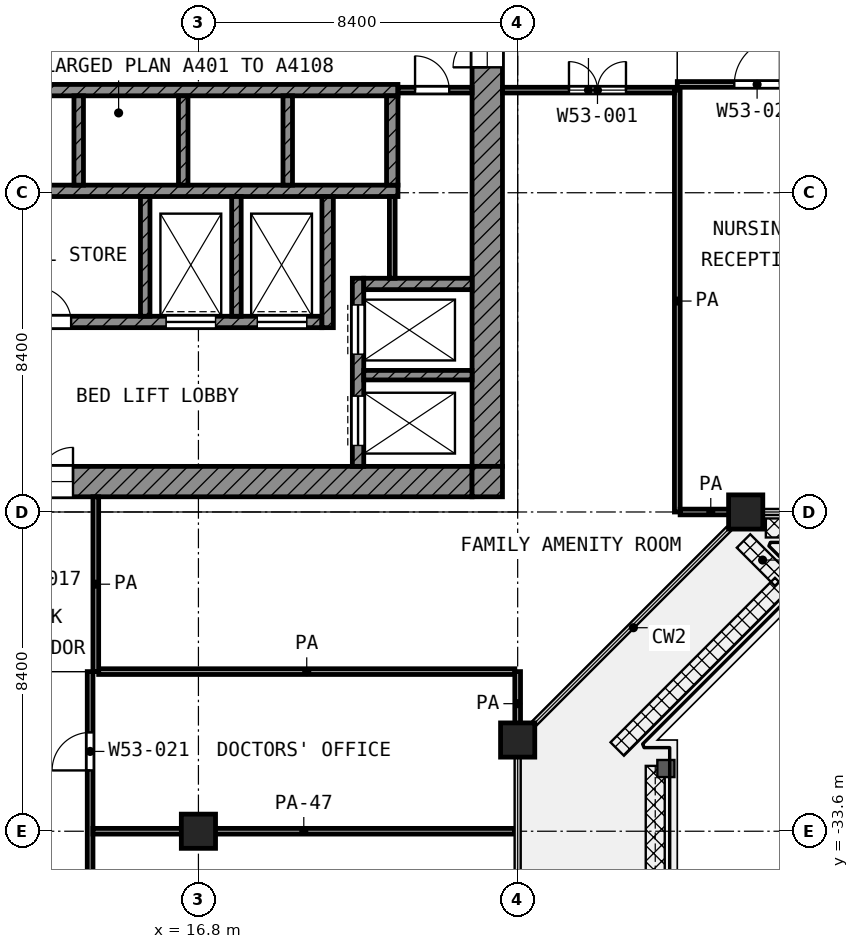
"""IFC4 building model, lengths in metres.
Left out: names, types, materials, properties, quantities, classifications, styles, units other than length and angle.
Written with IfcOpenShell. Run it as: python <this file> out.ifc"""

import sys

from ifc_helpers import new_model, si_unit, direction, frame, frame_2d, origin, origin_2d, place, context, subcontext, project, spatial, rectangle, extrude, element, fill, save


model = new_model("IFC4")
c1 = context("Model", 3, precision=1e-05, world=origin(), true_north=direction((0.0, 1.0)))
c2 = subcontext(c1, "Body", "Model", "MODEL_VIEW")
j1 = project(units=[si_unit("LENGTHUNIT", "METRE"), si_unit("PLANEANGLEUNIT", "RADIAN")], contexts=[c1])
p1 = place(None, origin())
s1 = spatial("IfcSite", under=j1, at=p1, CompositionType="ELEMENT")
p2 = place(p1, origin())
s2 = spatial("IfcBuilding", under=s1, at=p2, CompositionType="ELEMENT")
p3 = place(p2, frame((0.0, 0.0, 251.6)))
s3 = spatial("IfcBuildingStorey", under=s2, at=p3, CompositionType="ELEMENT", Elevation=251.6)
for number, where, z_axis, x_axis in (
    (1, (31.2, -25.2, 0.0), (0.0, 0.0, 1.0), (1.0, 0.0, 0.0)),
    (2, (25.2, -31.2, 0.0), (0.0, 0.0, 1.0), (1.0, 0.0, 0.0)),
    (3, (16.8, -33.6, 0.0), (0.0, 0.0, 1.0), (1.0, 0.0, 0.0)),
):
    element("IfcColumn", number, at=place(p3, frame(where, z_axis=z_axis, x_axis=x_axis)), inside=s3, PredefinedType="COLUMN", context=c2, shape_type="SweptSolid", body=[
        extrude(rectangle(XDim=0.9, YDim=0.9, at=origin_2d()), origin(), (0.0, 0.0, 1.0), 4.2),
    ])
p4 = place(p3, frame((24.4, -24.0, 0.0), z_axis=(0.0, 0.0, 1.0), x_axis=(0.0, 1.0, 0.0)))
e4 = element("IfcWall", 4, at=p4, inside=s3, PredefinedType="SHEAR", context=c2, shape_type="SweptSolid", body=[
    extrude(rectangle(XDim=18.6, YDim=0.8, at=frame_2d((9.3, 0.0))), origin(), (0.0, 0.0, 1.0), 3.6),
])
p5 = place(p4, frame((10.5, 0.0, 0.0)))
e5 = element("IfcOpeningElement", 5, at=p5, cuts=e4, PredefinedType="OPENING", context=c2, shape_type="SweptSolid", body=[
    extrude(rectangle(XDim=1.8, YDim=2.1, at=frame_2d((0.9, 1.05))), frame((0.0, 0.41, 0.0), z_axis=(0.0, -1.0, 0.0), x_axis=(1.0, 0.0, 0.0)), (0.0, 0.0, 1.0), 0.82),
])
p6 = place(p3, frame((5.4, -24.4, 0.0), z_axis=(0.0, 0.0, 1.0), x_axis=(1.0, 0.0, 0.0)))
e6 = element("IfcWall", 6, at=p6, inside=s3, PredefinedType="SHEAR", context=c2, shape_type="SweptSolid", body=[
    extrude(rectangle(XDim=18.6, YDim=0.8, at=frame_2d((9.3, 0.0))), origin(), (0.0, 0.0, 1.0), 3.6),
])
p7 = place(p6, frame((6.3, 0.0, 0.0)))
e7 = element("IfcOpeningElement", 7, at=p7, cuts=e6, PredefinedType="OPENING", context=c2, shape_type="SweptSolid", body=[
    extrude(rectangle(XDim=1.8, YDim=2.1, at=frame_2d((0.9, 1.05))), frame((0.0, 0.41, 0.0), z_axis=(0.0, -1.0, 0.0), x_axis=(1.0, 0.0, 0.0)), (0.0, 0.0, 1.0), 0.82),
])
p8 = place(p3, frame((24.4, -24.8, 0.0), z_axis=(0.0, 0.0, 1.0), x_axis=(0.0, 1.0, 0.0)))
e8 = element("IfcWall", 8, at=p8, inside=s3, PredefinedType="SHEAR", context=c2, shape_type="SweptSolid", body=[
    extrude(rectangle(XDim=0.8, YDim=0.8, at=frame_2d((0.4, 0.0))), origin(), (0.0, 0.0, 1.0), 3.6),
])
p9 = place(p3, frame((5.4, -14.1, 0.0), z_axis=(0.0, 0.0, 1.0), x_axis=(1.0, 0.0, 0.0)))
e9 = element("IfcWall", 9, at=p9, inside=s3, PredefinedType="SHEAR", context=c2, shape_type="SweptSolid", body=[
    extrude(rectangle(XDim=16.65, YDim=0.3, at=frame_2d((8.325, 0.0))), origin(), (0.0, 0.0, 1.0), 3.6),
])
p10 = place(p9, frame((0.825, 0.0, 0.0)))
e10 = element("IfcOpeningElement", 10, at=p10, cuts=e9, PredefinedType="OPENING", context=c2, shape_type="SweptSolid", body=[
    extrude(rectangle(XDim=1.1, YDim=2.1, at=frame_2d((0.55, 1.05))), frame((0.0, 0.16, 0.0), z_axis=(0.0, -1.0, 0.0), x_axis=(1.0, 0.0, 0.0)), (0.0, 0.0, 1.0), 0.32),
])
p11 = place(p9, frame((3.575, 0.0, 0.0)))
e11 = element("IfcOpeningElement", 11, at=p11, cuts=e9, PredefinedType="OPENING", context=c2, shape_type="SweptSolid", body=[
    extrude(rectangle(XDim=1.1, YDim=2.1, at=frame_2d((0.55, 1.05))), frame((0.0, 0.16, 0.0), z_axis=(0.0, -1.0, 0.0), x_axis=(1.0, 0.0, 0.0)), (0.0, 0.0, 1.0), 0.32),
])
p12 = place(p3, frame((5.4, -16.75, 0.0), z_axis=(0.0, 0.0, 1.0), x_axis=(1.0, 0.0, 0.0)))
e12 = element("IfcWall", 12, at=p12, inside=s3, PredefinedType="SHEAR", context=c2, shape_type="SweptSolid", body=[
    extrude(rectangle(XDim=16.65, YDim=0.3, at=frame_2d((8.325, 0.0))), origin(), (0.0, 0.0, 1.0), 3.6),
])
p13 = place(p3, frame((5.4, -20.2, 0.0), z_axis=(0.0, 0.0, 1.0), x_axis=(1.0, 0.0, 0.0)))
e13 = element("IfcWall", 13, at=p13, inside=s3, PredefinedType="SHEAR", context=c2, shape_type="SweptSolid", body=[
    extrude(rectangle(XDim=14.65, YDim=0.3, at=frame_2d((7.325, 0.0))), origin(), (0.0, 0.0, 1.0), 3.6),
])
p14 = place(p13, frame((10.55, 0.0, 0.0)))
e14 = element("IfcOpeningElement", 14, at=p14, cuts=e13, PredefinedType="OPENING", context=c2, shape_type="SweptSolid", body=[
    extrude(rectangle(XDim=1.3, YDim=2.1, at=frame_2d((0.65, 1.05))), frame((0.0, 0.16, 0.0), z_axis=(0.0, -1.0, 0.0), x_axis=(1.0, 0.0, 0.0)), (0.0, 0.0, 1.0), 0.32),
])
p15 = place(p13, frame((12.95, 0.0, 0.0)))
e15 = element("IfcOpeningElement", 15, at=p15, cuts=e13, PredefinedType="OPENING", context=c2, shape_type="SweptSolid", body=[
    extrude(rectangle(XDim=1.3, YDim=2.1, at=frame_2d((0.65, 1.05))), frame((0.0, 0.16, 0.0), z_axis=(0.0, -1.0, 0.0), x_axis=(1.0, 0.0, 0.0)), (0.0, 0.0, 1.0), 0.32),
])
p16 = place(p13, frame((0.55, 0.0, 0.0)))
e16 = element("IfcOpeningElement", 16, at=p16, cuts=e13, PredefinedType="OPENING", context=c2, shape_type="SweptSolid", body=[
    extrude(rectangle(XDim=1.3, YDim=2.1, at=frame_2d((0.65, 1.05))), frame((0.0, 0.16, 0.0), z_axis=(0.0, -1.0, 0.0), x_axis=(1.0, 0.0, 0.0)), (0.0, 0.0, 1.0), 0.32),
])
p17 = place(p13, frame((2.95, 0.0, 0.0)))
e17 = element("IfcOpeningElement", 17, at=p17, cuts=e13, PredefinedType="OPENING", context=c2, shape_type="SweptSolid", body=[
    extrude(rectangle(XDim=1.3, YDim=2.1, at=frame_2d((0.65, 1.05))), frame((0.0, 0.16, 0.0), z_axis=(0.0, -1.0, 0.0), x_axis=(1.0, 0.0, 0.0)), (0.0, 0.0, 1.0), 0.32),
])
p18 = place(p13, frame((7.15, 0.0, 0.0)))
e18 = element("IfcOpeningElement", 18, at=p18, cuts=e13, PredefinedType="OPENING", context=c2, shape_type="SweptSolid", body=[
    extrude(rectangle(XDim=0.9, YDim=2.1, at=frame_2d((0.45, 1.05))), frame((0.0, 0.16, 0.0), z_axis=(0.0, -1.0, 0.0), x_axis=(1.0, 0.0, 0.0)), (0.0, 0.0, 1.0), 0.32),
])
p19 = place(p3, frame((20.2, -20.35, 0.0), z_axis=(0.0, 0.0, 1.0), x_axis=(0.0, 1.0, 0.0)))
e19 = element("IfcWall", 19, at=p19, inside=s3, PredefinedType="SHEAR", context=c2, shape_type="SweptSolid", body=[
    extrude(rectangle(XDim=3.45, YDim=0.3, at=frame_2d((1.725, 0.0))), origin(), (0.0, 0.0, 1.0), 3.6),
])
p20 = place(p3, frame((21.9, -16.6, 0.0), z_axis=(0.0, 0.0, 1.0), x_axis=(0.0, 1.0, 0.0)))
e20 = element("IfcWall", 20, at=p20, inside=s3, PredefinedType="SHEAR", context=c2, shape_type="SweptSolid", body=[
    extrude(rectangle(XDim=2.35, YDim=0.3, at=frame_2d((1.175, 0.0))), origin(), (0.0, 0.0, 1.0), 3.6),
])
p21 = place(p3, frame((21.15, -19.2, 0.0), z_axis=(0.0, 0.0, 1.0), x_axis=(1.0, 0.0, 0.0)))
e21 = element("IfcWall", 21, at=p21, inside=s3, PredefinedType="SHEAR", context=c2, shape_type="SweptSolid", body=[
    extrude(rectangle(XDim=2.85, YDim=0.3, at=frame_2d((1.425, 0.0))), origin(), (0.0, 0.0, 1.0), 3.6),
])
p22 = place(p3, frame((21.0, -24.0, 0.0), z_axis=(0.0, 0.0, 1.0), x_axis=(0.0, 1.0, 0.0)))
e22 = element("IfcWall", 22, at=p22, inside=s3, PredefinedType="SHEAR", context=c2, shape_type="SweptSolid", body=[
    extrude(rectangle(XDim=4.95, YDim=0.3, at=frame_2d((2.475, 0.0))), origin(), (0.0, 0.0, 1.0), 3.6),
])
p23 = place(p22, frame((2.95, 0.0, 0.0)))
e23 = element("IfcOpeningElement", 23, at=p23, cuts=e22, PredefinedType="OPENING", context=c2, shape_type="SweptSolid", body=[
    extrude(rectangle(XDim=1.3, YDim=2.1, at=frame_2d((0.65, 1.05))), frame((0.0, 0.16, 0.0), z_axis=(0.0, -1.0, 0.0), x_axis=(1.0, 0.0, 0.0)), (0.0, 0.0, 1.0), 0.32),
])
p24 = place(p22, frame((0.55, 0.0, 0.0)))
e24 = element("IfcOpeningElement", 24, at=p24, cuts=e22, PredefinedType="OPENING", context=c2, shape_type="SweptSolid", body=[
    extrude(rectangle(XDim=1.3, YDim=2.1, at=frame_2d((0.65, 1.05))), frame((0.0, 0.16, 0.0), z_axis=(0.0, -1.0, 0.0), x_axis=(1.0, 0.0, 0.0)), (0.0, 0.0, 1.0), 0.32),
])
p25 = place(p3, frame((21.15, -21.6, 0.0), z_axis=(0.0, 0.0, 1.0), x_axis=(1.0, 0.0, 0.0)))
e25 = element("IfcWall", 25, at=p25, inside=s3, PredefinedType="SHEAR", context=c2, shape_type="SweptSolid", body=[
    extrude(rectangle(XDim=2.85, YDim=0.25, at=frame_2d((1.425, 0.0))), origin(), (0.0, 0.0, 1.0), 3.6),
])
for number, where, z_axis, x_axis in (
    (26, (15.4, -20.05, 0.0), (0.0, 0.0, 1.0), (0.0, 1.0, 0.0)),
    (27, (17.8, -20.05, 0.0), (0.0, 0.0, 1.0), (0.0, 1.0, 0.0)),
):
    element("IfcWall", number, at=place(p3, frame(where, z_axis=z_axis, x_axis=x_axis)), inside=s3, PredefinedType="SHEAR", context=c2, shape_type="SweptSolid", body=[
        extrude(rectangle(XDim=3.15, YDim=0.25, at=frame_2d((1.575, 0.0))), origin(), (0.0, 0.0, 1.0), 3.6),
    ])
for number, where, z_axis, x_axis in (
    (28, (13.65, -16.6, 0.0), (0.0, 0.0, 1.0), (0.0, 1.0, 0.0)),
    (29, (16.4, -16.6, 0.0), (0.0, 0.0, 1.0), (0.0, 1.0, 0.0)),
    (30, (19.15, -16.6, 0.0), (0.0, 0.0, 1.0), (0.0, 1.0, 0.0)),
):
    element("IfcWall", number, at=place(p3, frame(where, z_axis=z_axis, x_axis=x_axis)), inside=s3, PredefinedType="SHEAR", context=c2, shape_type="SweptSolid", body=[
        extrude(rectangle(XDim=2.35, YDim=0.25, at=frame_2d((1.175, 0.0))), origin(), (0.0, 0.0, 1.0), 3.6),
    ])
p26 = place(p3, frame((21.9, -19.05, 0.0), z_axis=(0.0, 0.0, 1.0), x_axis=(0.0, 1.0, 0.0)))
e31 = element("IfcWall", 31, at=p26, inside=s3, PredefinedType="PARTITIONING", context=c2, shape_type="SweptSolid", body=[
    extrude(rectangle(XDim=2.15, YDim=0.15, at=frame_2d((1.075, 0.0))), origin(), (0.0, 0.0, 1.0), 3.6),
])
p27 = place(p3, frame((22.05, -14.1, 0.0), z_axis=(0.0, 0.0, 1.0), x_axis=(1.0, 0.0, 0.0)))
e32 = element("IfcWall", 32, at=p27, inside=s3, PredefinedType="PARTITIONING", context=c2, shape_type="SweptSolid", body=[
    extrude(rectangle(XDim=1.95, YDim=0.15, at=frame_2d((0.975, 0.0))), origin(), (0.0, 0.0, 1.0), 3.6),
])
p28 = place(p27, frame((0.45, 0.0, 0.0)))
e33 = element("IfcOpeningElement", 33, at=p28, cuts=e32, PredefinedType="OPENING", context=c2, shape_type="SweptSolid", body=[
    extrude(rectangle(XDim=0.9, YDim=2.1, at=frame_2d((0.45, 1.05))), frame((0.0, 0.085, 0.0), z_axis=(0.0, -1.0, 0.0), x_axis=(1.0, 0.0, 0.0)), (0.0, 0.0, 1.0), 0.17),
])
p29 = place(p3, frame((14.025, -33.6, 0.0), z_axis=(0.0, 0.0, 1.0), x_axis=(1.0, 0.0, 0.0)))
e34 = element("IfcWall", 34, at=p29, inside=s3, PredefinedType="PARTITIONING", context=c2, shape_type="SweptSolid", body=[
    extrude(rectangle(XDim=11.095, YDim=0.15, at=frame_2d((5.548, 0.0))), origin(), (0.0, 0.0, 1.0), 2.7),
])
p30 = place(p3, frame((14.175, -29.4, 0.0), z_axis=(0.0, 0.0, 1.0), x_axis=(1.0, 0.0, 0.0)))
e35 = element("IfcWall", 35, at=p30, inside=s3, PredefinedType="PARTITIONING", context=c2, shape_type="SweptSolid", body=[
    extrude(rectangle(XDim=10.95, YDim=0.15, at=frame_2d((5.475, 0.0))), origin(), (0.0, 0.0, 1.0), 3.6),
])
p31 = place(p3, frame((29.475, -25.2, 0.0), z_axis=(0.0, 0.0, 1.0), x_axis=(1.0, 0.0, 0.0)))
e36 = element("IfcWall", 36, at=p31, inside=s3, PredefinedType="PARTITIONING", context=c2, shape_type="SweptSolid", body=[
    extrude(rectangle(XDim=1.612, YDim=0.15, at=frame_2d((0.806, 0.0))), origin(), (0.0, 0.0, 1.0), 3.6),
])
p32 = place(p3, frame((24.8, -14.1, 0.0), z_axis=(0.0, 0.0, 1.0), x_axis=(1.0, 0.0, 0.0)))
e37 = element("IfcWall", 37, at=p32, inside=s3, PredefinedType="PARTITIONING", context=c2, shape_type="SweptSolid", body=[
    extrude(rectangle(XDim=4.525, YDim=0.15, at=frame_2d((2.262, 0.0))), origin(), (0.0, 0.0, 1.0), 3.6),
])
p33 = place(p32, frame((1.75, 0.0, 0.0)))
e38 = element("IfcOpeningElement", 38, at=p33, cuts=e37, PredefinedType="OPENING", context=c2, shape_type="SweptSolid", body=[
    extrude(rectangle(XDim=1.5, YDim=2.1, at=frame_2d((0.75, 1.05))), frame((0.0, 0.085, 0.0), z_axis=(0.0, -1.0, 0.0), x_axis=(1.0, 0.0, 0.0)), (0.0, 0.0, 1.0), 0.17),
])
p34 = place(p3, frame((29.4, -13.95, 0.0), z_axis=(0.0, 0.0, 1.0), x_axis=(1.0, 0.0, 0.0)))
e39 = element("IfcWall", 39, at=p34, inside=s3, PredefinedType="PARTITIONING", context=c2, shape_type="SweptSolid", body=[
    extrude(rectangle(XDim=33.52, YDim=0.15, at=frame_2d((16.76, 0.0))), origin(), (0.0, 0.0, 1.0), 2.7),
])
p35 = place(p34, frame((1.5, 0.0, 0.0)))
e40 = element("IfcOpeningElement", 40, at=p35, cuts=e39, PredefinedType="OPENING", context=c2, shape_type="SweptSolid", body=[
    extrude(rectangle(XDim=1.2, YDim=2.1, at=frame_2d((0.6, 1.05))), frame((0.0, 0.085, 0.0), z_axis=(0.0, -1.0, 0.0), x_axis=(1.0, 0.0, 0.0)), (0.0, 0.0, 1.0), 0.17),
])
p36 = place(p34, frame((6.1, 0.0, 0.0)))
e41 = element("IfcOpeningElement", 41, at=p36, cuts=e39, PredefinedType="OPENING", context=c2, shape_type="SweptSolid", body=[
    extrude(rectangle(XDim=1.0, YDim=2.1, at=frame_2d((0.5, 1.05))), frame((0.0, 0.085, 0.0), z_axis=(0.0, -1.0, 0.0), x_axis=(1.0, 0.0, 0.0)), (0.0, 0.0, 1.0), 0.17),
])
p37 = place(p34, frame((11.3, 0.0, 0.0)))
e42 = element("IfcOpeningElement", 42, at=p37, cuts=e39, PredefinedType="OPENING", context=c2, shape_type="SweptSolid", body=[
    extrude(rectangle(XDim=1.1, YDim=2.1, at=frame_2d((0.55, 1.05))), frame((0.0, 0.085, 0.0), z_axis=(0.0, -1.0, 0.0), x_axis=(1.0, 0.0, 0.0)), (0.0, 0.0, 1.0), 0.17),
])
p38 = place(p34, frame((13.0, 0.0, 0.0)))
e43 = element("IfcOpeningElement", 43, at=p38, cuts=e39, PredefinedType="OPENING", context=c2, shape_type="SweptSolid", body=[
    extrude(rectangle(XDim=1.2, YDim=2.1, at=frame_2d((0.6, 1.05))), frame((0.0, 0.085, 0.0), z_axis=(0.0, -1.0, 0.0), x_axis=(1.0, 0.0, 0.0)), (0.0, 0.0, 1.0), 0.17),
])
p39 = place(p34, frame((22.6, 0.0, 0.0)))
e44 = element("IfcOpeningElement", 44, at=p39, cuts=e39, PredefinedType="OPENING", context=c2, shape_type="SweptSolid", body=[
    extrude(rectangle(XDim=1.2, YDim=2.1, at=frame_2d((0.6, 1.05))), frame((0.0, 0.085, 0.0), z_axis=(0.0, -1.0, 0.0), x_axis=(1.0, 0.0, 0.0)), (0.0, 0.0, 1.0), 0.17),
])
p40 = place(p34, frame((20.3, 0.0, 0.0)))
e45 = element("IfcOpeningElement", 45, at=p40, cuts=e39, PredefinedType="OPENING", context=c2, shape_type="SweptSolid", body=[
    extrude(rectangle(XDim=1.2, YDim=2.1, at=frame_2d((0.6, 1.05))), frame((0.0, 0.085, 0.0), z_axis=(0.0, -1.0, 0.0), x_axis=(1.0, 0.0, 0.0)), (0.0, 0.0, 1.0), 0.17),
])
p41 = place(p34, frame((28.0, 0.0, 0.0)))
e46 = element("IfcOpeningElement", 46, at=p41, cuts=e39, PredefinedType="OPENING", context=c2, shape_type="SweptSolid", body=[
    extrude(rectangle(XDim=1.2, YDim=2.1, at=frame_2d((0.6, 1.05))), frame((0.0, 0.085, 0.0), z_axis=(0.0, -1.0, 0.0), x_axis=(1.0, 0.0, 0.0)), (0.0, 0.0, 1.0), 0.17),
])
p42 = place(p34, frame((31.0, 0.0, 0.0)))
e47 = element("IfcOpeningElement", 47, at=p42, cuts=e39, PredefinedType="OPENING", context=c2, shape_type="SweptSolid", body=[
    extrude(rectangle(XDim=1.0, YDim=2.1, at=frame_2d((0.5, 1.05))), frame((0.0, 0.085, 0.0), z_axis=(0.0, -1.0, 0.0), x_axis=(1.0, 0.0, 0.0)), (0.0, 0.0, 1.0), 0.17),
])
p43 = place(p3, frame((13.95, -46.12, 0.0), z_axis=(0.0, 0.0, 1.0), x_axis=(0.0, 1.0, 0.0)))
e48 = element("IfcWall", 48, at=p43, inside=s3, PredefinedType="PARTITIONING", context=c2, shape_type="SweptSolid", body=[
    extrude(rectangle(XDim=16.72, YDim=0.15, at=frame_2d((8.36, 0.0))), origin(), (0.0, 0.0, 1.0), 3.6),
])
p44 = place(p43, frame((14.12, 0.0, 0.0)))
e49 = element("IfcOpeningElement", 49, at=p44, cuts=e48, PredefinedType="OPENING", context=c2, shape_type="SweptSolid", body=[
    extrude(rectangle(XDim=1.0, YDim=2.1, at=frame_2d((0.5, 1.05))), frame((0.0, 0.085, 0.0), z_axis=(0.0, -1.0, 0.0), x_axis=(1.0, 0.0, 0.0)), (0.0, 0.0, 1.0), 0.17),
])
p45 = place(p43, frame((9.92, 0.0, 0.0)))
e50 = element("IfcOpeningElement", 50, at=p45, cuts=e48, PredefinedType="OPENING", context=c2, shape_type="SweptSolid", body=[
    extrude(rectangle(XDim=1.0, YDim=2.1, at=frame_2d((0.5, 1.05))), frame((0.0, 0.085, 0.0), z_axis=(0.0, -1.0, 0.0), x_axis=(1.0, 0.0, 0.0)), (0.0, 0.0, 1.0), 0.17),
])
p46 = place(p43, frame((3.37, 0.0, 0.0)))
e51 = element("IfcOpeningElement", 51, at=p46, cuts=e48, PredefinedType="OPENING", context=c2, shape_type="SweptSolid", body=[
    extrude(rectangle(XDim=1.5, YDim=2.1, at=frame_2d((0.75, 1.05))), frame((0.0, 0.085, 0.0), z_axis=(0.0, -1.0, 0.0), x_axis=(1.0, 0.0, 0.0)), (0.0, 0.0, 1.0), 0.17),
])
p47 = place(p3, frame((14.1, -29.4, 0.0), z_axis=(0.0, 0.0, 1.0), x_axis=(0.0, 1.0, 0.0)))
e52 = element("IfcWall", 52, at=p47, inside=s3, PredefinedType="PARTITIONING", context=c2, shape_type="SweptSolid", body=[
    extrude(rectangle(XDim=4.6, YDim=0.15, at=frame_2d((2.3, 0.0))), origin(), (0.0, 0.0, 1.0), 3.6),
])
p48 = place(p3, frame((25.2, -31.087, 0.0), z_axis=(0.0, 0.0, 1.0), x_axis=(0.0, 1.0, 0.0)))
e53 = element("IfcWall", 53, at=p48, inside=s3, PredefinedType="PARTITIONING", context=c2, shape_type="SweptSolid", body=[
    extrude(rectangle(XDim=1.687, YDim=0.15, at=frame_2d((0.844, 0.0))), origin(), (0.0, 0.0, 1.0), 3.6),
])
p49 = place(p3, frame((29.4, -25.2, 0.0), z_axis=(0.0, 0.0, 1.0), x_axis=(0.0, 1.0, 0.0)))
e54 = element("IfcWall", 54, at=p49, inside=s3, PredefinedType="PARTITIONING", context=c2, shape_type="SweptSolid", body=[
    extrude(rectangle(XDim=11.1, YDim=0.15, at=frame_2d((5.55, 0.0))), origin(), (0.0, 0.0, 1.0), 3.6),
])
p50 = place(p23, origin())
e55 = element("IfcDoor", 55, at=p50, inside=s3, OperationType="DOUBLE_DOOR_SLIDING", PredefinedType="DOOR", context=c2, shape_type="SweptSolid", body=[
    extrude(rectangle(XDim=1.3, YDim=2.1, at=frame_2d((0.65, 1.05))), frame((0.0, 0.025, 0.0), z_axis=(0.0, -1.0, 0.0), x_axis=(1.0, 0.0, 0.0)), (0.0, 0.0, 1.0), 0.05),
])
fill(e23, e55)
p51 = place(p24, origin())
e56 = element("IfcDoor", 56, at=p51, inside=s3, OperationType="DOUBLE_DOOR_SLIDING", PredefinedType="DOOR", context=c2, shape_type="SweptSolid", body=[
    extrude(rectangle(XDim=1.3, YDim=2.1, at=frame_2d((0.65, 1.05))), frame((0.0, 0.025, 0.0), z_axis=(0.0, -1.0, 0.0), x_axis=(1.0, 0.0, 0.0)), (0.0, 0.0, 1.0), 0.05),
])
fill(e24, e56)
p52 = place(p14, origin())
e57 = element("IfcDoor", 57, at=p52, inside=s3, OperationType="DOUBLE_DOOR_SLIDING", PredefinedType="DOOR", context=c2, shape_type="SweptSolid", body=[
    extrude(rectangle(XDim=1.3, YDim=2.1, at=frame_2d((0.65, 1.05))), frame((0.0, 0.025, 0.0), z_axis=(0.0, -1.0, 0.0), x_axis=(1.0, 0.0, 0.0)), (0.0, 0.0, 1.0), 0.05),
])
fill(e14, e57)
p53 = place(p15, origin())
e58 = element("IfcDoor", 58, at=p53, inside=s3, OperationType="DOUBLE_DOOR_SLIDING", PredefinedType="DOOR", context=c2, shape_type="SweptSolid", body=[
    extrude(rectangle(XDim=1.3, YDim=2.1, at=frame_2d((0.65, 1.05))), frame((0.0, 0.025, 0.0), z_axis=(0.0, -1.0, 0.0), x_axis=(1.0, 0.0, 0.0)), (0.0, 0.0, 1.0), 0.05),
])
fill(e15, e58)
p54 = place(p5, origin())
e59 = element("IfcDoor", 59, at=p54, inside=s3, OperationType="DOUBLE_DOOR_SINGLE_SWING", PredefinedType="DOOR", context=c2, shape_type="SweptSolid", body=[
    extrude(rectangle(XDim=1.8, YDim=2.1, at=frame_2d((0.9, 1.05))), frame((0.0, 0.025, 0.0), z_axis=(0.0, -1.0, 0.0), x_axis=(1.0, 0.0, 0.0)), (0.0, 0.0, 1.0), 0.05),
])
fill(e5, e59)
p55 = place(p7, origin())
e60 = element("IfcDoor", 60, at=p55, inside=s3, OperationType="DOUBLE_DOOR_SINGLE_SWING", PredefinedType="DOOR", context=c2, shape_type="SweptSolid", body=[
    extrude(rectangle(XDim=1.8, YDim=2.1, at=frame_2d((0.9, 1.05))), frame((0.0, 0.025, 0.0), z_axis=(0.0, -1.0, 0.0), x_axis=(1.0, 0.0, 0.0)), (0.0, 0.0, 1.0), 0.05),
])
fill(e7, e60)
p56 = place(p28, origin())
e61 = element("IfcDoor", 61, at=p56, inside=s3, OperationType="SINGLE_SWING_LEFT", PredefinedType="DOOR", context=c2, shape_type="SweptSolid", body=[
    extrude(rectangle(XDim=0.9, YDim=2.1, at=frame_2d((0.45, 1.05))), frame((0.0, 0.025, 0.0), z_axis=(0.0, -1.0, 0.0), x_axis=(1.0, 0.0, 0.0)), (0.0, 0.0, 1.0), 0.05),
])
fill(e33, e61)
p57 = place(p18, origin())
e62 = element("IfcDoor", 62, at=p57, inside=s3, OperationType="SINGLE_SWING_LEFT", PredefinedType="DOOR", context=c2, shape_type="SweptSolid", body=[
    extrude(rectangle(XDim=0.9, YDim=2.1, at=frame_2d((0.45, 1.05))), frame((0.0, 0.025, 0.0), z_axis=(0.0, -1.0, 0.0), x_axis=(1.0, 0.0, 0.0)), (0.0, 0.0, 1.0), 0.05),
])
fill(e18, e62)
p58 = place(p33, origin())
e63 = element("IfcDoor", 63, at=p58, inside=s3, OperationType="DOUBLE_DOOR_SINGLE_SWING", PredefinedType="DOOR", context=c2, shape_type="SweptSolid", body=[
    extrude(rectangle(XDim=1.5, YDim=2.1, at=frame_2d((0.75, 1.05))), frame((0.0, 0.025, 0.0), z_axis=(0.0, -1.0, 0.0), x_axis=(1.0, 0.0, 0.0)), (0.0, 0.0, 1.0), 0.05),
])
fill(e38, e63)
p59 = place(p35, origin())
e64 = element("IfcDoor", 64, at=p59, inside=s3, OperationType="SINGLE_SWING_RIGHT", PredefinedType="DOOR", context=c2, shape_type="SweptSolid", body=[
    extrude(rectangle(XDim=1.2, YDim=2.1, at=frame_2d((0.6, 1.05))), frame((0.0, 0.025, 0.0), z_axis=(0.0, -1.0, 0.0), x_axis=(1.0, 0.0, 0.0)), (0.0, 0.0, 1.0), 0.05),
])
fill(e40, e64)
p60 = place(p44, origin())
e65 = element("IfcDoor", 65, at=p60, inside=s3, OperationType="SINGLE_SWING_LEFT", PredefinedType="DOOR", context=c2, shape_type="SweptSolid", body=[
    extrude(rectangle(XDim=1.0, YDim=2.1, at=frame_2d((0.5, 1.05))), frame((0.0, 0.025, 0.0), z_axis=(0.0, -1.0, 0.0), x_axis=(1.0, 0.0, 0.0)), (0.0, 0.0, 1.0), 0.05),
])
fill(e49, e65)
save(model, sys.argv[1])
